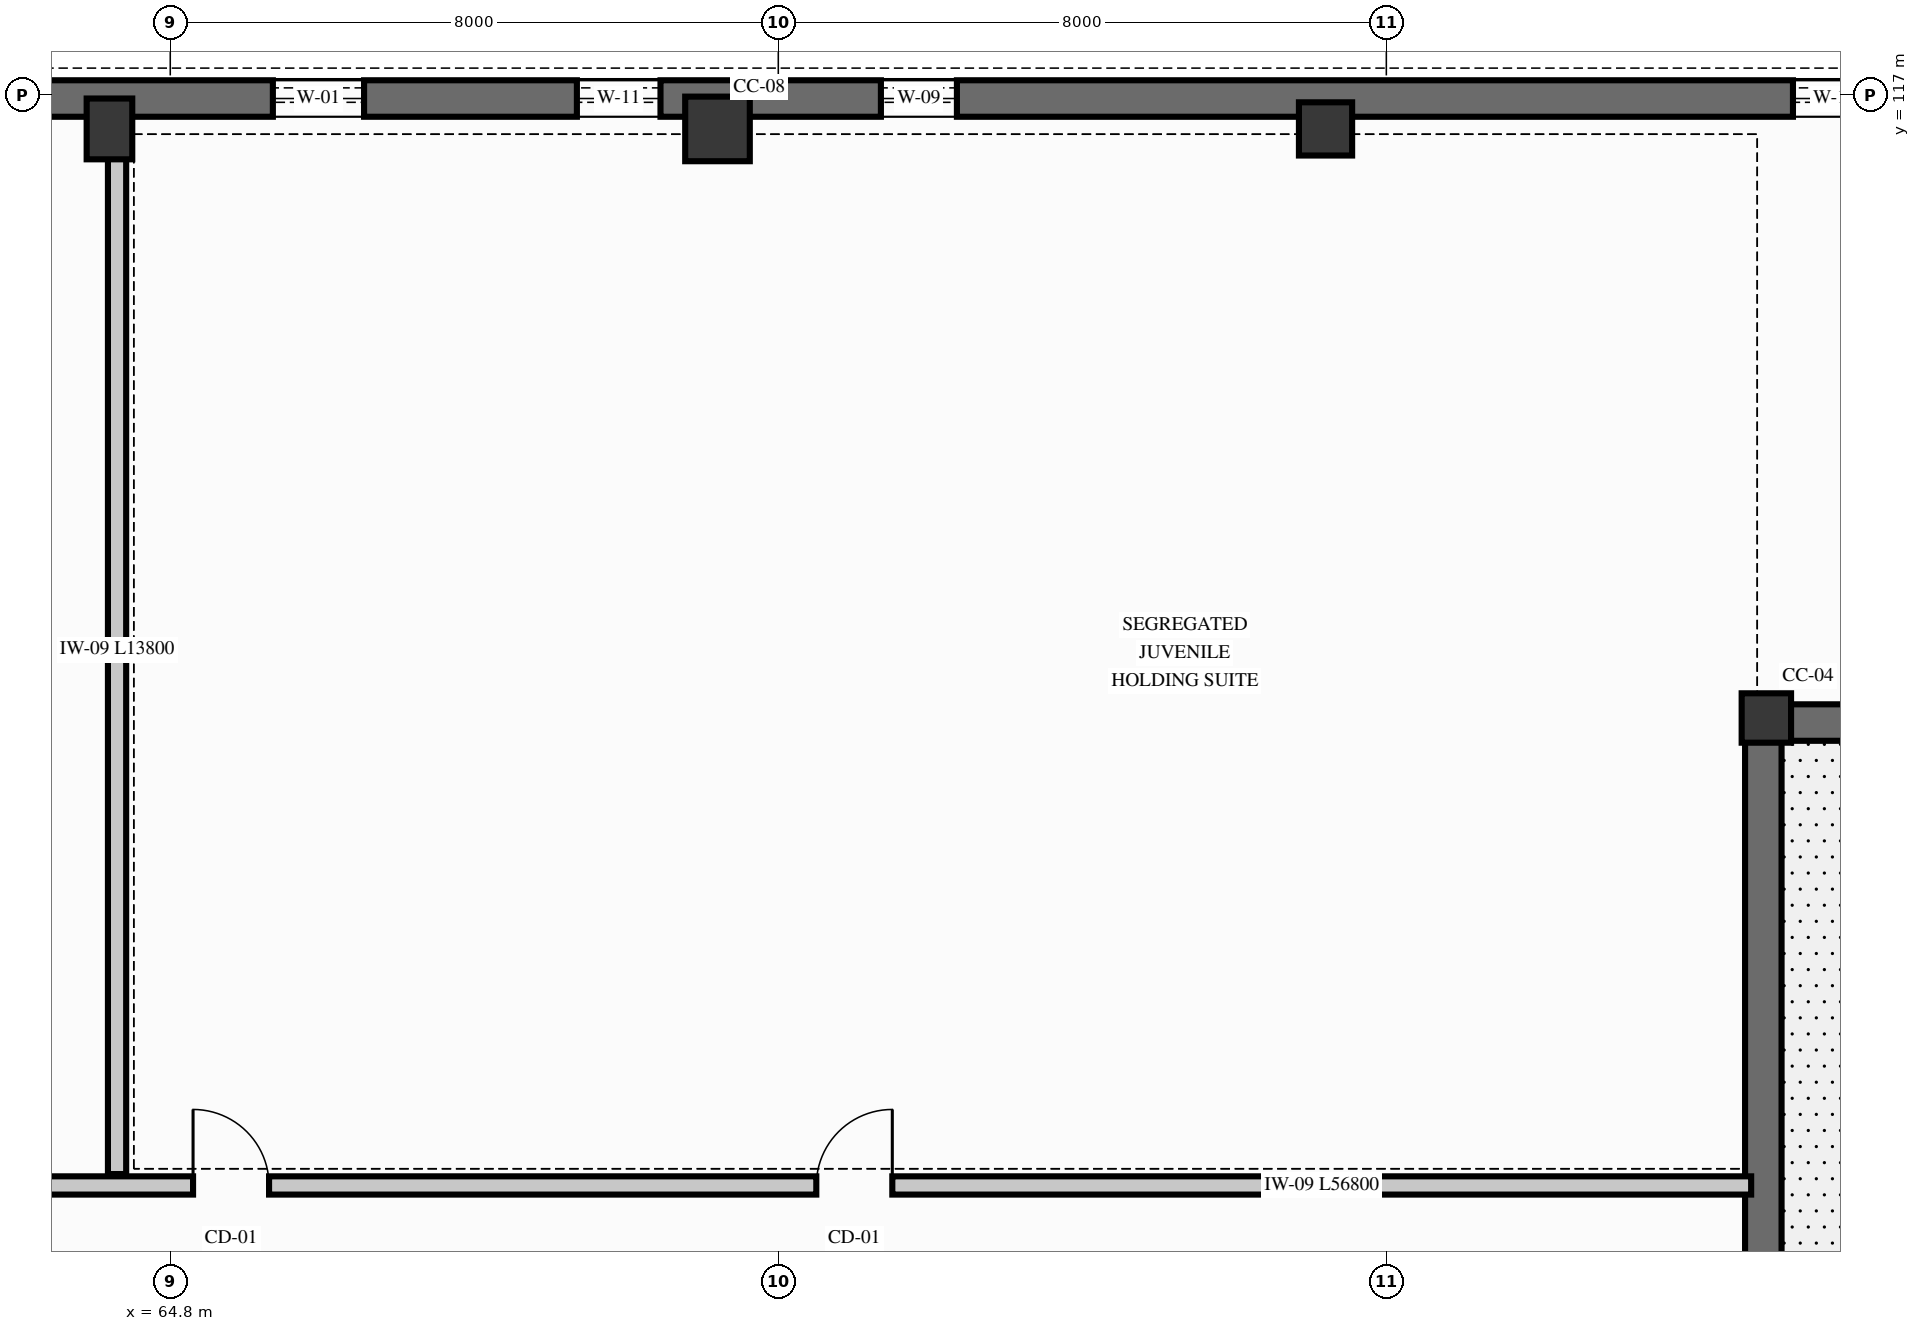
"""IFC4 building model, lengths in metres.
Left out: names, types, materials, properties, quantities, classifications, styles, units other than length and angle.
Written with IfcOpenShell. Run it as: python <this file> out.ifc"""

import sys

from ifc_helpers import new_model, si_unit, direction, frame, frame_2d, origin, origin_2d, place, context, subcontext, project, spatial, rectangle, extrude, element, fill, save


model = new_model("IFC4")
c1 = context("Model", 3, precision=1e-05, world=origin(), true_north=direction((0.0, 1.0)))
c2 = subcontext(c1, "Body", "Model", "MODEL_VIEW")
j1 = project(units=[si_unit("LENGTHUNIT", "METRE"), si_unit("PLANEANGLEUNIT", "RADIAN")], contexts=[c1])
p1 = place(None, origin())
s1 = spatial("IfcSite", under=j1, at=p1, CompositionType="ELEMENT")
p2 = place(p1, origin())
s2 = spatial("IfcBuilding", under=s1, at=p2, CompositionType="ELEMENT")
p3 = place(p2, origin())
s3 = spatial("IfcBuildingStorey", under=s2, at=p3, CompositionType="ELEMENT", Elevation=0.0)
p4 = place(p3, frame((85.8, 108.8, 0.0), z_axis=(0.0, 0.0, 1.0), x_axis=(1.0, 0.0, 0.0)))
e1 = element("IfcColumn", 1, at=p4, inside=s3, PredefinedType="COLUMN", context=c2, shape_type="SweptSolid", body=[
    extrude(rectangle(XDim=0.65, YDim=0.65, at=origin_2d()), origin(), (0.0, 0.0, 1.0), 4.78),
])
p5 = place(p3, frame((64.0, 116.55, 0.0), z_axis=(0.0, 0.0, 1.0), x_axis=(1.0, 0.0, 0.0)))
e2 = element("IfcColumn", 2, at=p5, inside=s3, PredefinedType="COLUMN", context=c2, shape_type="SweptSolid", body=[
    extrude(rectangle(XDim=0.6, YDim=0.8, at=origin_2d()), origin(), (0.0, 0.0, 1.0), 5.1),
])
p6 = place(p3, frame((72.0, 116.55, 0.0), z_axis=(0.0, 0.0, 1.0), x_axis=(1.0, 0.0, 0.0)))
e3 = element("IfcColumn", 3, at=p6, inside=s3, PredefinedType="COLUMN", context=c2, shape_type="SweptSolid", body=[
    extrude(rectangle(XDim=0.85, YDim=0.85, at=origin_2d()), origin(), (0.0, 0.0, 1.0), 5.1),
])
p7 = place(p3, frame((80.0, 116.55, 0.0), z_axis=(0.0, 0.0, 1.0), x_axis=(1.0, 0.0, 0.0)))
e4 = element("IfcColumn", 4, at=p7, inside=s3, PredefinedType="COLUMN", context=c2, shape_type="SweptSolid", body=[
    extrude(rectangle(XDim=0.7, YDim=0.7, at=origin_2d()), origin(), (0.0, 0.0, 1.0), 5.1),
])
p8 = place(p3, frame((28.5, 116.95, 0.0), z_axis=(0.0, 0.0, 1.0), x_axis=(1.0, 0.0, 0.0)))
e5 = element("IfcWall", 5, at=p8, inside=s3, PredefinedType="SOLIDWALL", context=c2, shape_type="SweptSolid", body=[
    extrude(rectangle(XDim=95.25, YDim=0.48, at=frame_2d((47.625, 0.0))), origin(), (0.0, 0.0, 1.0), 4.88),
])
p9 = place(p8, frame((1.65, 0.0, 1.35)))
e6 = element("IfcOpeningElement", 6, at=p9, cuts=e5, PredefinedType="OPENING", context=c2, shape_type="SweptSolid", body=[
    extrude(rectangle(XDim=1.4, YDim=2.2, at=frame_2d((0.7, 1.1))), frame((0.0, 0.25, 0.0), z_axis=(0.0, -1.0, 0.0), x_axis=(1.0, 0.0, 0.0)), (0.0, 0.0, 1.0), 0.5),
])
p10 = place(p8, frame((5.65, 0.0, 1.35)))
e7 = element("IfcOpeningElement", 7, at=p10, cuts=e5, PredefinedType="OPENING", context=c2, shape_type="SweptSolid", body=[
    extrude(rectangle(XDim=1.2, YDim=2.1, at=frame_2d((0.6, 1.05))), frame((0.0, 0.25, 0.0), z_axis=(0.0, -1.0, 0.0), x_axis=(1.0, 0.0, 0.0)), (0.0, 0.0, 1.0), 0.5),
])
p11 = place(p8, frame((13.65, 0.0, 1.35)))
e8 = element("IfcOpeningElement", 8, at=p11, cuts=e5, PredefinedType="OPENING", context=c2, shape_type="SweptSolid", body=[
    extrude(rectangle(XDim=1.0, YDim=1.6, at=frame_2d((0.5, 0.8))), frame((0.0, 0.25, 0.0), z_axis=(0.0, -1.0, 0.0), x_axis=(1.0, 0.0, 0.0)), (0.0, 0.0, 1.0), 0.5),
])
p12 = place(p8, frame((21.65, 0.0, 1.35)))
e9 = element("IfcOpeningElement", 9, at=p12, cuts=e5, PredefinedType="OPENING", context=c2, shape_type="SweptSolid", body=[
    extrude(rectangle(XDim=1.2, YDim=2.1, at=frame_2d((0.6, 1.05))), frame((0.0, 0.25, 0.0), z_axis=(0.0, -1.0, 0.0), x_axis=(1.0, 0.0, 0.0)), (0.0, 0.0, 1.0), 0.5),
])
p13 = place(p8, frame((25.65, 0.0, 1.35)))
e10 = element("IfcOpeningElement", 10, at=p13, cuts=e5, PredefinedType="OPENING", context=c2, shape_type="SweptSolid", body=[
    extrude(rectangle(XDim=1.1, YDim=1.5, at=frame_2d((0.55, 0.75))), frame((0.0, 0.25, 0.0), z_axis=(0.0, -1.0, 0.0), x_axis=(1.0, 0.0, 0.0)), (0.0, 0.0, 1.0), 0.5),
])
p14 = place(p8, frame((29.65, 0.0, 1.35)))
e11 = element("IfcOpeningElement", 11, at=p14, cuts=e5, PredefinedType="OPENING", context=c2, shape_type="SweptSolid", body=[
    extrude(rectangle(XDim=1.0, YDim=1.6, at=frame_2d((0.5, 0.8))), frame((0.0, 0.25, 0.0), z_axis=(0.0, -1.0, 0.0), x_axis=(1.0, 0.0, 0.0)), (0.0, 0.0, 1.0), 0.5),
])
p15 = place(p8, frame((37.65, 0.0, 1.35)))
e12 = element("IfcOpeningElement", 12, at=p15, cuts=e5, PredefinedType="OPENING", context=c2, shape_type="SweptSolid", body=[
    extrude(rectangle(XDim=1.2, YDim=2.1, at=frame_2d((0.6, 1.05))), frame((0.0, 0.25, 0.0), z_axis=(0.0, -1.0, 0.0), x_axis=(1.0, 0.0, 0.0)), (0.0, 0.0, 1.0), 0.5),
])
p16 = place(p8, frame((41.65, 0.0, 1.35)))
e13 = element("IfcOpeningElement", 13, at=p16, cuts=e5, PredefinedType="OPENING", context=c2, shape_type="SweptSolid", body=[
    extrude(rectangle(XDim=1.1, YDim=1.5, at=frame_2d((0.55, 0.75))), frame((0.0, 0.25, 0.0), z_axis=(0.0, -1.0, 0.0), x_axis=(1.0, 0.0, 0.0)), (0.0, 0.0, 1.0), 0.5),
])
p17 = place(p8, frame((45.65, 0.0, 1.35)))
e14 = element("IfcOpeningElement", 14, at=p17, cuts=e5, PredefinedType="OPENING", context=c2, shape_type="SweptSolid", body=[
    extrude(rectangle(XDim=1.0, YDim=1.6, at=frame_2d((0.5, 0.8))), frame((0.0, 0.25, 0.0), z_axis=(0.0, -1.0, 0.0), x_axis=(1.0, 0.0, 0.0)), (0.0, 0.0, 1.0), 0.5),
])
p18 = place(p8, frame((57.65, 0.0, 1.35)))
e15 = element("IfcOpeningElement", 15, at=p18, cuts=e5, PredefinedType="OPENING", context=c2, shape_type="SweptSolid", body=[
    extrude(rectangle(XDim=1.1, YDim=1.5, at=frame_2d((0.55, 0.75))), frame((0.0, 0.25, 0.0), z_axis=(0.0, -1.0, 0.0), x_axis=(1.0, 0.0, 0.0)), (0.0, 0.0, 1.0), 0.5),
])
p19 = place(p8, frame((61.65, 0.0, 1.35)))
e16 = element("IfcOpeningElement", 16, at=p19, cuts=e5, PredefinedType="OPENING", context=c2, shape_type="SweptSolid", body=[
    extrude(rectangle(XDim=1.0, YDim=1.6, at=frame_2d((0.5, 0.8))), frame((0.0, 0.25, 0.0), z_axis=(0.0, -1.0, 0.0), x_axis=(1.0, 0.0, 0.0)), (0.0, 0.0, 1.0), 0.5),
])
p20 = place(p8, frame((69.65, 0.0, 1.35)))
e17 = element("IfcOpeningElement", 17, at=p20, cuts=e5, PredefinedType="OPENING", context=c2, shape_type="SweptSolid", body=[
    extrude(rectangle(XDim=1.2, YDim=2.1, at=frame_2d((0.6, 1.05))), frame((0.0, 0.25, 0.0), z_axis=(0.0, -1.0, 0.0), x_axis=(1.0, 0.0, 0.0)), (0.0, 0.0, 1.0), 0.5),
])
p21 = place(p8, frame((89.65, 0.0, 1.35)))
e18 = element("IfcOpeningElement", 18, at=p21, cuts=e5, PredefinedType="OPENING", context=c2, shape_type="SweptSolid", body=[
    extrude(rectangle(XDim=1.1, YDim=1.5, at=frame_2d((0.55, 0.75))), frame((0.0, 0.25, 0.0), z_axis=(0.0, -1.0, 0.0), x_axis=(1.0, 0.0, 0.0)), (0.0, 0.0, 1.0), 0.5),
])
p22 = place(p3, frame((85.76, 108.74, 0.0), z_axis=(0.0, 0.0, 1.0), x_axis=(1.0, 0.0, 0.0)))
e19 = element("IfcWall", 19, at=p22, inside=s3, PredefinedType="SOLIDWALL", context=c2, shape_type="SweptSolid", body=[
    extrude(rectangle(XDim=16.48, YDim=0.48, at=frame_2d((8.24, 0.0))), origin(), (0.0, 0.0, 1.0), 4.74),
])
p23 = place(p3, frame((85.76, 91.5, 0.0), z_axis=(0.0, 0.0, 1.0), x_axis=(0.0, 1.0, 0.0)))
e20 = element("IfcWall", 20, at=p23, inside=s3, PredefinedType="SOLIDWALL", context=c2, shape_type="SweptSolid", body=[
    extrude(rectangle(XDim=17.0, YDim=0.48, at=frame_2d((8.5, 0.0))), origin(), (0.0, 0.0, 1.0), 4.74),
])
p24 = place(p23, frame((9.2, 0.0, 0.0), z_axis=(0.0, 0.0, 1.0), x_axis=(-1.0, 0.0, 0.0)))
e21 = element("IfcOpeningElement", 21, at=p24, cuts=e20, PredefinedType="OPENING", context=c2, shape_type="SweptSolid", body=[
    extrude(rectangle(XDim=1.2, YDim=2.3, at=frame_2d((0.6, 1.15))), frame((0.0, 0.25, 0.0), z_axis=(0.0, -1.0, 0.0), x_axis=(1.0, 0.0, 0.0)), (0.0, 0.0, 1.0), 0.5),
])
p25 = place(p3, frame((28.8, 102.65, 0.0), z_axis=(0.0, 0.0, 1.0), x_axis=(1.0, 0.0, 0.0)))
e22 = element("IfcWall", 22, at=p25, inside=s3, PredefinedType="PARTITIONING", context=c2, shape_type="SweptSolid", body=[
    extrude(rectangle(XDim=56.8, YDim=0.24, at=frame_2d((28.4, 0.0))), origin(), (0.0, 0.0, 1.0), 4.298),
])
p26 = place(p25, frame((3.5, 0.0, 0.0)))
e23 = element("IfcOpeningElement", 23, at=p26, cuts=e22, PredefinedType="OPENING", context=c2, shape_type="SweptSolid", body=[
    extrude(rectangle(XDim=1.0, YDim=2.15, at=frame_2d((0.5, 1.075))), frame((0.0, 0.13, 0.0), z_axis=(0.0, -1.0, 0.0), x_axis=(1.0, 0.0, 0.0)), (0.0, 0.0, 1.0), 0.26),
])
p27 = place(p25, frame((11.7, 0.0, 0.0)))
e24 = element("IfcOpeningElement", 24, at=p27, cuts=e22, PredefinedType="OPENING", context=c2, shape_type="SweptSolid", body=[
    extrude(rectangle(XDim=1.0, YDim=2.15, at=frame_2d((0.5, 1.075))), frame((0.0, 0.13, 0.0), z_axis=(0.0, -1.0, 0.0), x_axis=(1.0, 0.0, 0.0)), (0.0, 0.0, 1.0), 0.26),
])
p28 = place(p25, frame((19.9, 0.0, 0.0)))
e25 = element("IfcOpeningElement", 25, at=p28, cuts=e22, PredefinedType="OPENING", context=c2, shape_type="SweptSolid", body=[
    extrude(rectangle(XDim=1.0, YDim=2.15, at=frame_2d((0.5, 1.075))), frame((0.0, 0.13, 0.0), z_axis=(0.0, -1.0, 0.0), x_axis=(1.0, 0.0, 0.0)), (0.0, 0.0, 1.0), 0.26),
])
p29 = place(p25, frame((28.1, 0.0, 0.0)))
e26 = element("IfcOpeningElement", 26, at=p29, cuts=e22, PredefinedType="OPENING", context=c2, shape_type="SweptSolid", body=[
    extrude(rectangle(XDim=1.0, YDim=2.15, at=frame_2d((0.5, 1.075))), frame((0.0, 0.13, 0.0), z_axis=(0.0, -1.0, 0.0), x_axis=(1.0, 0.0, 0.0)), (0.0, 0.0, 1.0), 0.26),
])
p30 = place(p25, frame((36.3, 0.0, 0.0)))
e27 = element("IfcOpeningElement", 27, at=p30, cuts=e22, PredefinedType="OPENING", context=c2, shape_type="SweptSolid", body=[
    extrude(rectangle(XDim=1.0, YDim=2.15, at=frame_2d((0.5, 1.075))), frame((0.0, 0.13, 0.0), z_axis=(0.0, -1.0, 0.0), x_axis=(1.0, 0.0, 0.0)), (0.0, 0.0, 1.0), 0.26),
])
p31 = place(p25, frame((44.5, 0.0, 0.0)))
e28 = element("IfcOpeningElement", 28, at=p31, cuts=e22, PredefinedType="OPENING", context=c2, shape_type="SweptSolid", body=[
    extrude(rectangle(XDim=1.0, YDim=2.15, at=frame_2d((0.5, 1.075))), frame((0.0, 0.13, 0.0), z_axis=(0.0, -1.0, 0.0), x_axis=(1.0, 0.0, 0.0)), (0.0, 0.0, 1.0), 0.26),
])
p32 = place(p3, frame((64.1, 102.8, 0.0), z_axis=(0.0, 0.0, 1.0), x_axis=(0.0, 1.0, 0.0)))
e29 = element("IfcWall", 29, at=p32, inside=s3, PredefinedType="PARTITIONING", context=c2, shape_type="SweptSolid", body=[
    extrude(rectangle(XDim=13.8, YDim=0.24, at=frame_2d((6.9, 0.0))), origin(), (0.0, 0.0, 1.0), 4.3),
])
p33 = place(p15, origin())
e30 = element("IfcWindow", 30, at=p33, inside=s3, PartitioningType="SINGLE_PANEL", PredefinedType="WINDOW", context=c2, shape_type="SweptSolid", body=[
    extrude(rectangle(XDim=1.2, YDim=2.1, at=frame_2d((0.6, 1.05))), frame((0.0, 0.03, 0.0), z_axis=(0.0, -1.0, 0.0), x_axis=(1.0, 0.0, 0.0)), (0.0, 0.0, 1.0), 0.06),
])
fill(e12, e30)
p34 = place(p16, origin())
e31 = element("IfcWindow", 31, at=p34, inside=s3, PartitioningType="SINGLE_PANEL", PredefinedType="WINDOW", context=c2, shape_type="SweptSolid", body=[
    extrude(rectangle(XDim=1.1, YDim=1.5, at=frame_2d((0.55, 0.75))), frame((0.0, 0.03, 0.0), z_axis=(0.0, -1.0, 0.0), x_axis=(1.0, 0.0, 0.0)), (0.0, 0.0, 1.0), 0.06),
])
fill(e13, e31)
p35 = place(p17, origin())
e32 = element("IfcWindow", 32, at=p35, inside=s3, PartitioningType="SINGLE_PANEL", PredefinedType="WINDOW", context=c2, shape_type="SweptSolid", body=[
    extrude(rectangle(XDim=1.0, YDim=1.6, at=frame_2d((0.5, 0.8))), frame((0.0, 0.03, 0.0), z_axis=(0.0, -1.0, 0.0), x_axis=(1.0, 0.0, 0.0)), (0.0, 0.0, 1.0), 0.06),
])
fill(e14, e32)
p36 = place(p18, origin())
e33 = element("IfcWindow", 33, at=p36, inside=s3, PartitioningType="SINGLE_PANEL", PredefinedType="WINDOW", context=c2, shape_type="SweptSolid", body=[
    extrude(rectangle(XDim=1.1, YDim=1.5, at=frame_2d((0.55, 0.75))), frame((0.0, 0.03, 0.0), z_axis=(0.0, -1.0, 0.0), x_axis=(1.0, 0.0, 0.0)), (0.0, 0.0, 1.0), 0.06),
])
fill(e15, e33)
p37 = place(p30, origin())
e34 = element("IfcDoor", 34, at=p37, inside=s3, OperationType="SINGLE_SWING_LEFT", PredefinedType="DOOR", context=c2, shape_type="SweptSolid", body=[
    extrude(rectangle(XDim=1.0, YDim=2.15, at=frame_2d((0.5, 1.075))), frame((0.0, 0.025, 0.0), z_axis=(0.0, -1.0, 0.0), x_axis=(1.0, 0.0, 0.0)), (0.0, 0.0, 1.0), 0.05),
])
fill(e27, e34)
p38 = place(p31, origin())
e35 = element("IfcDoor", 35, at=p38, inside=s3, OperationType="SINGLE_SWING_RIGHT", PredefinedType="DOOR", context=c2, shape_type="SweptSolid", body=[
    extrude(rectangle(XDim=1.0, YDim=2.15, at=frame_2d((0.5, 1.075))), frame((0.0, 0.025, 0.0), z_axis=(0.0, -1.0, 0.0), x_axis=(1.0, 0.0, 0.0)), (0.0, 0.0, 1.0), 0.05),
])
fill(e28, e35)
save(model, sys.argv[1])
